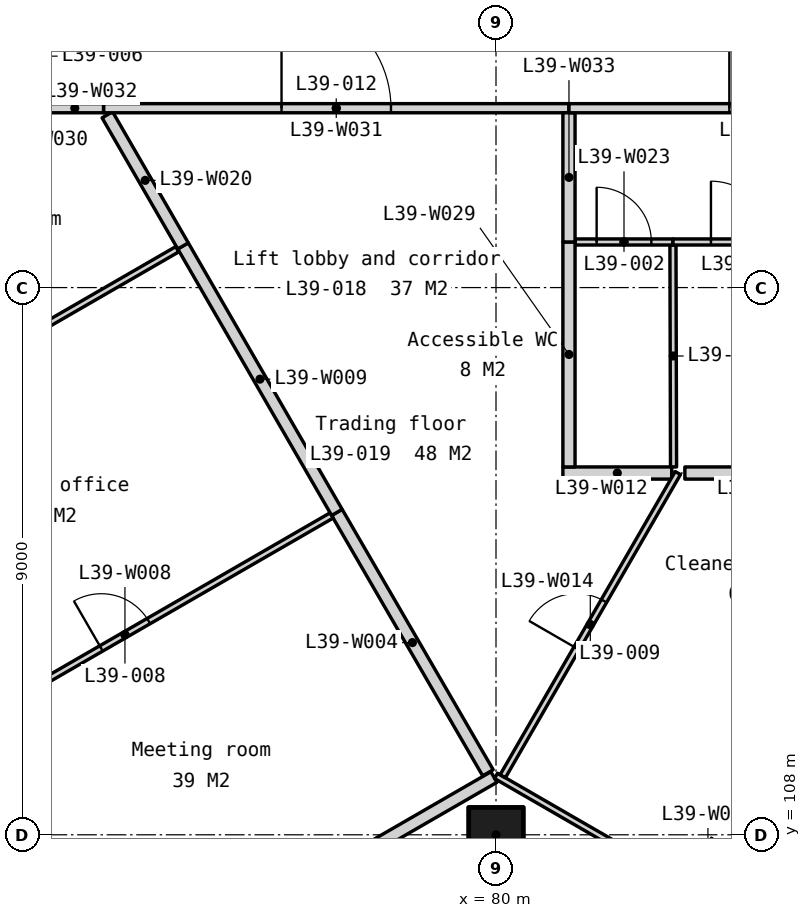
"""IFC4 building model, lengths in metres.
Left out: names, types, materials, properties, quantities, classifications, styles, units other than length and angle.
Written with IfcOpenShell. Run it as: python <this file> out.ifc"""

import sys

from ifc_helpers import new_model, si_unit, direction, frame, frame_2d, origin, origin_2d, place, context, subcontext, project, spatial, polyline, rectangle, outline, extrude, element, fill, save


model = new_model("IFC4")
c1 = context("Model", 3, precision=1e-05, world=origin(), true_north=direction((0.0, 1.0)))
c2 = subcontext(c1, "Body", "Model", "MODEL_VIEW")
j1 = project(units=[si_unit("LENGTHUNIT", "METRE"), si_unit("PLANEANGLEUNIT", "RADIAN")], contexts=[c1])
p1 = place(None, origin())
s1 = spatial("IfcSite", under=j1, at=p1, CompositionType="ELEMENT")
p2 = place(p1, origin())
s2 = spatial("IfcBuilding", under=s1, at=p2, CompositionType="ELEMENT")
p3 = place(p2, frame((0.0, 0.0, 155.9)))
s3 = spatial("IfcBuildingStorey", under=s2, at=p3, CompositionType="ELEMENT", Elevation=155.9)
p4 = place(p3, frame((80.0, 108.0, 0.0), z_axis=(0.0, 0.0, 1.0), x_axis=(1.0, 0.0, 0.0)))
e1 = element("IfcColumn", 1, at=p4, inside=s3, PredefinedType="COLUMN", context=c2, shape_type="SweptSolid", body=[
    extrude(rectangle(XDim=0.9, YDim=0.9, at=origin_2d()), origin(), (0.0, 0.0, 1.0), 3.9),
])
p5 = place(p3, frame((57.652, 131.129, -0.15), z_axis=(0.0, 0.0, 1.0), x_axis=(0.499997369791, -0.866026922331, 0.0)))
e2 = element("IfcWall", 2, at=p5, inside=s3, PredefinedType="SOLIDWALL", context=c2, shape_type="SweptSolid", body=[
    extrude(outline(polyline([(40.486, 0.0), (40.486, 3.9), (0.0, 3.9), (0.0, 0.0), (40.486, 0.0)])), frame((0.0, 0.225, 0.0), z_axis=(0.0, -1.0, 0.0), x_axis=(1.0, 0.0, 0.0)), (0.0, 0.0, 1.0), 0.45),
])
p6 = place(p5, frame((3.011, 0.0, 0.95)))
e3 = element("IfcOpeningElement", 3, at=p6, cuts=e2, PredefinedType="OPENING", context=c2, shape_type="SweptSolid", body=[
    extrude(rectangle(XDim=1.8, YDim=2.2, at=frame_2d((0.9, 1.1))), frame((0.0, 0.235, 0.0), z_axis=(0.0, -1.0, 0.0), x_axis=(1.0, 0.0, 0.0)), (0.0, 0.0, 1.0), 0.47),
])
p7 = place(p5, frame((5.311, 0.0, 0.95)))
e4 = element("IfcOpeningElement", 4, at=p7, cuts=e2, PredefinedType="OPENING", context=c2, shape_type="SweptSolid", body=[
    extrude(rectangle(XDim=1.8, YDim=2.2, at=frame_2d((0.9, 1.1))), frame((0.0, 0.235, 0.0), z_axis=(0.0, -1.0, 0.0), x_axis=(1.0, 0.0, 0.0)), (0.0, 0.0, 1.0), 0.47),
])
p8 = place(p5, frame((13.132, 0.0, 0.95)))
e5 = element("IfcOpeningElement", 5, at=p8, cuts=e2, PredefinedType="OPENING", context=c2, shape_type="SweptSolid", body=[
    extrude(rectangle(XDim=1.8, YDim=2.2, at=frame_2d((0.9, 1.1))), frame((0.0, 0.235, 0.0), z_axis=(0.0, -1.0, 0.0), x_axis=(1.0, 0.0, 0.0)), (0.0, 0.0, 1.0), 0.47),
])
p9 = place(p5, frame((15.432, 0.0, 0.95)))
e6 = element("IfcOpeningElement", 6, at=p9, cuts=e2, PredefinedType="OPENING", context=c2, shape_type="SweptSolid", body=[
    extrude(rectangle(XDim=1.8, YDim=2.2, at=frame_2d((0.9, 1.1))), frame((0.0, 0.235, 0.0), z_axis=(0.0, -1.0, 0.0), x_axis=(1.0, 0.0, 0.0)), (0.0, 0.0, 1.0), 0.47),
])
p10 = place(p5, frame((23.254, 0.0, 0.95)))
e7 = element("IfcOpeningElement", 7, at=p10, cuts=e2, PredefinedType="OPENING", context=c2, shape_type="SweptSolid", body=[
    extrude(rectangle(XDim=1.8, YDim=2.2, at=frame_2d((0.9, 1.1))), frame((0.0, 0.235, 0.0), z_axis=(0.0, -1.0, 0.0), x_axis=(1.0, 0.0, 0.0)), (0.0, 0.0, 1.0), 0.47),
])
p11 = place(p5, frame((25.554, 0.0, 0.95)))
e8 = element("IfcOpeningElement", 8, at=p11, cuts=e2, PredefinedType="OPENING", context=c2, shape_type="SweptSolid", body=[
    extrude(rectangle(XDim=1.8, YDim=2.2, at=frame_2d((0.9, 1.1))), frame((0.0, 0.235, 0.0), z_axis=(0.0, -1.0, 0.0), x_axis=(1.0, 0.0, 0.0)), (0.0, 0.0, 1.0), 0.47),
])
p12 = place(p5, frame((33.375, 0.0, 0.95)))
e9 = element("IfcOpeningElement", 9, at=p12, cuts=e2, PredefinedType="OPENING", context=c2, shape_type="SweptSolid", body=[
    extrude(rectangle(XDim=1.8, YDim=2.2, at=frame_2d((0.9, 1.1))), frame((0.0, 0.235, 0.0), z_axis=(0.0, -1.0, 0.0), x_axis=(1.0, 0.0, 0.0)), (0.0, 0.0, 1.0), 0.47),
])
p13 = place(p5, frame((35.675, 0.0, 0.95)))
e10 = element("IfcOpeningElement", 10, at=p13, cuts=e2, PredefinedType="OPENING", context=c2, shape_type="SweptSolid", body=[
    extrude(rectangle(XDim=1.8, YDim=2.2, at=frame_2d((0.9, 1.1))), frame((0.0, 0.235, 0.0), z_axis=(0.0, -1.0, 0.0), x_axis=(1.0, 0.0, 0.0)), (0.0, 0.0, 1.0), 0.47),
])
p14 = place(p3, frame((82.105, 96.067, -0.15), z_axis=(0.0, 0.0, 1.0), x_axis=(0.499997369791, 0.866026922331, 0.0)))
e11 = element("IfcWall", 11, at=p14, inside=s3, PredefinedType="SOLIDWALL", context=c2, shape_type="SweptSolid", body=[
    extrude(outline(polyline([(40.486, 0.0), (40.486, 3.9), (0.0, 3.9), (0.0, 0.0), (40.486, 0.0)])), frame((0.0, 0.225, 0.0), z_axis=(0.0, -1.0, 0.0), x_axis=(1.0, 0.0, 0.0)), (0.0, 0.0, 1.0), 0.45),
])
p15 = place(p14, frame((3.011, 0.0, 0.95)))
e12 = element("IfcOpeningElement", 12, at=p15, cuts=e11, PredefinedType="OPENING", context=c2, shape_type="SweptSolid", body=[
    extrude(rectangle(XDim=1.8, YDim=2.2, at=frame_2d((0.9, 1.1))), frame((0.0, 0.235, 0.0), z_axis=(0.0, -1.0, 0.0), x_axis=(1.0, 0.0, 0.0)), (0.0, 0.0, 1.0), 0.47),
])
p16 = place(p14, frame((5.311, 0.0, 0.95)))
e13 = element("IfcOpeningElement", 13, at=p16, cuts=e11, PredefinedType="OPENING", context=c2, shape_type="SweptSolid", body=[
    extrude(rectangle(XDim=1.8, YDim=2.2, at=frame_2d((0.9, 1.1))), frame((0.0, 0.235, 0.0), z_axis=(0.0, -1.0, 0.0), x_axis=(1.0, 0.0, 0.0)), (0.0, 0.0, 1.0), 0.47),
])
p17 = place(p14, frame((13.132, 0.0, 0.95)))
e14 = element("IfcOpeningElement", 14, at=p17, cuts=e11, PredefinedType="OPENING", context=c2, shape_type="SweptSolid", body=[
    extrude(rectangle(XDim=1.8, YDim=2.2, at=frame_2d((0.9, 1.1))), frame((0.0, 0.235, 0.0), z_axis=(0.0, -1.0, 0.0), x_axis=(1.0, 0.0, 0.0)), (0.0, 0.0, 1.0), 0.47),
])
p18 = place(p14, frame((15.432, 0.0, 0.95)))
e15 = element("IfcOpeningElement", 15, at=p18, cuts=e11, PredefinedType="OPENING", context=c2, shape_type="SweptSolid", body=[
    extrude(rectangle(XDim=1.8, YDim=2.2, at=frame_2d((0.9, 1.1))), frame((0.0, 0.235, 0.0), z_axis=(0.0, -1.0, 0.0), x_axis=(1.0, 0.0, 0.0)), (0.0, 0.0, 1.0), 0.47),
])
p19 = place(p14, frame((23.254, 0.0, 0.95)))
e16 = element("IfcOpeningElement", 16, at=p19, cuts=e11, PredefinedType="OPENING", context=c2, shape_type="SweptSolid", body=[
    extrude(rectangle(XDim=1.8, YDim=2.2, at=frame_2d((0.9, 1.1))), frame((0.0, 0.235, 0.0), z_axis=(0.0, -1.0, 0.0), x_axis=(1.0, 0.0, 0.0)), (0.0, 0.0, 1.0), 0.47),
])
p20 = place(p14, frame((25.554, 0.0, 0.95)))
e17 = element("IfcOpeningElement", 17, at=p20, cuts=e11, PredefinedType="OPENING", context=c2, shape_type="SweptSolid", body=[
    extrude(rectangle(XDim=1.8, YDim=2.2, at=frame_2d((0.9, 1.1))), frame((0.0, 0.235, 0.0), z_axis=(0.0, -1.0, 0.0), x_axis=(1.0, 0.0, 0.0)), (0.0, 0.0, 1.0), 0.47),
])
p21 = place(p14, frame((33.375, 0.0, 0.95)))
e18 = element("IfcOpeningElement", 18, at=p21, cuts=e11, PredefinedType="OPENING", context=c2, shape_type="SweptSolid", body=[
    extrude(rectangle(XDim=1.8, YDim=2.2, at=frame_2d((0.9, 1.1))), frame((0.0, 0.235, 0.0), z_axis=(0.0, -1.0, 0.0), x_axis=(1.0, 0.0, 0.0)), (0.0, 0.0, 1.0), 0.47),
])
p22 = place(p14, frame((35.675, 0.0, 0.95)))
e19 = element("IfcOpeningElement", 19, at=p22, cuts=e11, PredefinedType="OPENING", context=c2, shape_type="SweptSolid", body=[
    extrude(rectangle(XDim=1.8, YDim=2.2, at=frame_2d((0.9, 1.1))), frame((0.0, 0.235, 0.0), z_axis=(0.0, -1.0, 0.0), x_axis=(1.0, 0.0, 0.0)), (0.0, 0.0, 1.0), 0.47),
])
p23 = place(p3, frame((73.029, 104.945, 0.0), z_axis=(0.0, 0.0, 1.0), x_axis=(0.866028745538, 0.499994211868, 0.0)))
e20 = element("IfcWall", 20, at=p23, inside=s3, PredefinedType="PARTITIONING", context=c2, shape_type="SweptSolid", body=[
    extrude(rectangle(XDim=8.01, YDim=0.2, at=frame_2d((4.005, 0.0))), origin(), (0.0, 0.0, 1.0), 3.75),
])
p24 = place(p3, frame((77.384, 113.302, 0.0), z_axis=(0.0, 0.0, 1.0), x_axis=(0.501726207978, -0.865026480651, 0.0)))
e21 = element("IfcWall", 21, at=p24, inside=s3, PredefinedType="PARTITIONING", context=c2, shape_type="SweptSolid", body=[
    extrude(rectangle(XDim=4.951, YDim=0.2, at=frame_2d((2.475, 0.0))), origin(), (0.0, 0.0, 1.0), 3.75),
])
p25 = place(p3, frame((80.0, 108.969, 0.0), z_axis=(0.0, 0.0, 1.0), x_axis=(0.86602648383, -0.499998129301, 0.0)))
e22 = element("IfcWall", 22, at=p25, inside=s3, PredefinedType="PARTITIONING", context=c2, shape_type="SweptSolid", body=[
    extrude(rectangle(XDim=8.049, YDim=0.1, at=frame_2d((4.025, 0.0))), origin(), (0.0, 0.0, 1.0), 3.75),
])
p26 = place(p25, frame((3.575, 0.0, 0.0)))
e23 = element("IfcOpeningElement", 23, at=p26, cuts=e22, PredefinedType="OPENING", context=c2, shape_type="SweptSolid", body=[
    extrude(rectangle(XDim=0.9, YDim=2.1, at=frame_2d((0.45, 1.05))), frame((0.0, 0.06, 0.0), z_axis=(0.0, -1.0, 0.0), x_axis=(1.0, 0.0, 0.0)), (0.0, 0.0, 1.0), 0.12),
])
p27 = place(p3, frame((70.499, 109.327, 0.0), z_axis=(0.0, 0.0, 1.0), x_axis=(0.86602399778, 0.500002435262, 0.0)))
e24 = element("IfcWall", 24, at=p27, inside=s3, PredefinedType="PARTITIONING", context=c2, shape_type="SweptSolid", body=[
    extrude(rectangle(XDim=7.85, YDim=0.1, at=frame_2d((3.925, 0.0))), origin(), (0.0, 0.0, 1.0), 3.75),
])
p28 = place(p27, frame((3.475, 0.0, 0.0)))
e25 = element("IfcOpeningElement", 25, at=p28, cuts=e24, PredefinedType="OPENING", context=c2, shape_type="SweptSolid", body=[
    extrude(rectangle(XDim=0.9, YDim=2.1, at=frame_2d((0.45, 1.05))), frame((0.0, 0.06, 0.0), z_axis=(0.0, -1.0, 0.0), x_axis=(1.0, 0.0, 0.0)), (0.0, 0.0, 1.0), 0.12),
])
p29 = place(p3, frame((74.853, 117.685, 0.0), z_axis=(0.0, 0.0, 1.0), x_axis=(0.500014760403, -0.866016881694, 0.0)))
e26 = element("IfcWall", 26, at=p29, inside=s3, PredefinedType="PARTITIONING", context=c2, shape_type="SweptSolid", body=[
    extrude(rectangle(XDim=5.061, YDim=0.2, at=frame_2d((2.53, 0.0))), origin(), (0.0, 0.0, 1.0), 3.75),
])
p30 = place(p3, frame((67.968, 113.71, 0.0), z_axis=(0.0, 0.0, 1.0), x_axis=(0.866013415921, 0.500020763015, 0.0)))
e27 = element("IfcWall", 27, at=p30, inside=s3, PredefinedType="PARTITIONING", context=c2, shape_type="SweptSolid", body=[
    extrude(rectangle(XDim=7.84, YDim=0.1, at=frame_2d((3.92, 0.0))), origin(), (0.0, 0.0, 1.0), 3.75),
])
p31 = place(p30, frame((3.47, 0.0, 0.0)))
e28 = element("IfcOpeningElement", 28, at=p31, cuts=e27, PredefinedType="OPENING", context=c2, shape_type="SweptSolid", body=[
    extrude(rectangle(XDim=0.9, YDim=2.1, at=frame_2d((0.45, 1.05))), frame((0.0, 0.06, 0.0), z_axis=(0.0, -1.0, 0.0), x_axis=(1.0, 0.0, 0.0)), (0.0, 0.0, 1.0), 0.12),
])
p32 = place(p3, frame((81.1, 113.95, 0.0), z_axis=(0.0, 0.0, 1.0), x_axis=(1.0, 0.0, 0.0)))
e29 = element("IfcWall", 29, at=p32, inside=s3, PredefinedType="PARTITIONING", context=c2, shape_type="SweptSolid", body=[
    extrude(rectangle(XDim=1.79, YDim=0.2, at=frame_2d((0.895, 0.0))), origin(), (0.0, 0.0, 1.0), 3.75),
])
p33 = place(p3, frame((80.111, 108.963, 0.0), z_axis=(0.0, 0.0, 1.0), x_axis=(0.500033177651, 0.866006247812, 0.0)))
e30 = element("IfcWall", 30, at=p33, inside=s3, PredefinedType="PARTITIONING", context=c2, shape_type="SweptSolid", body=[
    extrude(rectangle(XDim=5.758, YDim=0.1, at=frame_2d((2.879, 0.0))), origin(), (0.0, 0.0, 1.0), 3.75),
])
p34 = place(p33, frame((2.429, 0.0, 0.0)))
e31 = element("IfcOpeningElement", 31, at=p34, cuts=e30, PredefinedType="OPENING", context=c2, shape_type="SweptSolid", body=[
    extrude(rectangle(XDim=0.9, YDim=2.1, at=frame_2d((0.45, 1.05))), frame((0.0, 0.06, 0.0), z_axis=(0.0, -1.0, 0.0), x_axis=(1.0, 0.0, 0.0)), (0.0, 0.0, 1.0), 0.12),
])
p35 = place(p3, frame((83.106, 113.95, 0.0), z_axis=(0.0, 0.0, 1.0), x_axis=(1.0, 0.0, 0.0)))
e32 = element("IfcWall", 32, at=p35, inside=s3, PredefinedType="PARTITIONING", context=c2, shape_type="SweptSolid", body=[
    extrude(rectangle(XDim=2.044, YDim=0.2, at=frame_2d((1.022, 0.0))), origin(), (0.0, 0.0, 1.0), 3.75),
])
p36 = place(p3, frame((73.608, 119.842, 0.0), z_axis=(0.0, 0.0, 1.0), x_axis=(0.50001949124, -0.86601415022, 0.0)))
e33 = element("IfcWall", 33, at=p36, inside=s3, PredefinedType="PARTITIONING", context=c2, shape_type="SweptSolid", body=[
    extrude(rectangle(XDim=2.49, YDim=0.2, at=frame_2d((1.245, 0.0))), origin(), (0.0, 0.0, 1.0), 3.75),
])
p37 = place(p3, frame((82.92, 114.05, 0.0), z_axis=(0.0, 0.0, 1.0), x_axis=(-0.002608686776, 0.999996597371, 0.0)))
e34 = element("IfcWall", 34, at=p37, inside=s3, PredefinedType="PARTITIONING", context=c2, shape_type="SweptSolid", body=[
    extrude(rectangle(XDim=3.65, YDim=0.1, at=frame_2d((1.825, 0.0))), origin(), (0.0, 0.0, 1.0), 3.75),
])
p38 = place(p3, frame((81.3, 117.75, 0.0), z_axis=(0.0, 0.0, 1.0), x_axis=(1.0, 0.0, 0.0)))
e35 = element("IfcWall", 35, at=p38, inside=s3, PredefinedType="PARTITIONING", context=c2, shape_type="SweptSolid", body=[
    extrude(rectangle(XDim=1.61, YDim=0.1, at=frame_2d((0.805, 0.0))), origin(), (0.0, 0.0, 1.0), 3.75),
])
p39 = place(p38, frame((0.355, 0.0, 0.0)))
e36 = element("IfcOpeningElement", 36, at=p39, cuts=e35, PredefinedType="OPENING", context=c2, shape_type="SweptSolid", body=[
    extrude(rectangle(XDim=0.9, YDim=2.1, at=frame_2d((0.45, 1.05))), frame((0.0, 0.06, 0.0), z_axis=(0.0, -1.0, 0.0), x_axis=(1.0, 0.0, 0.0)), (0.0, 0.0, 1.0), 0.12),
])
p40 = place(p3, frame((82.91, 117.75, 0.0), z_axis=(0.0, 0.0, 1.0), x_axis=(1.0, 0.0, 0.0)))
e37 = element("IfcWall", 37, at=p40, inside=s3, PredefinedType="PARTITIONING", context=c2, shape_type="SweptSolid", body=[
    extrude(rectangle(XDim=2.25, YDim=0.1, at=frame_2d((1.125, 0.0))), origin(), (0.0, 0.0, 1.0), 3.75),
])
p41 = place(p40, frame((0.625, 0.0, 0.0)))
e38 = element("IfcOpeningElement", 38, at=p41, cuts=e37, PredefinedType="OPENING", context=c2, shape_type="SweptSolid", body=[
    extrude(rectangle(XDim=1.0, YDim=2.1, at=frame_2d((0.5, 1.05))), frame((0.0, 0.06, 0.0), z_axis=(0.0, -1.0, 0.0), x_axis=(1.0, 0.0, 0.0)), (0.0, 0.0, 1.0), 0.12),
])
p42 = place(p3, frame((81.2, 114.05, 0.0), z_axis=(0.0, 0.0, 1.0), x_axis=(0.0, 1.0, 0.0)))
e39 = element("IfcWall", 39, at=p42, inside=s3, PredefinedType="PARTITIONING", context=c2, shape_type="SweptSolid", body=[
    extrude(rectangle(XDim=3.7, YDim=0.2, at=frame_2d((1.85, 0.0))), origin(), (0.0, 0.0, 1.0), 3.75),
])
p43 = place(p3, frame((73.545, 119.95, 0.0), z_axis=(0.0, 0.0, 1.0), x_axis=(1.0, 0.0, 0.0)))
e40 = element("IfcWall", 40, at=p43, inside=s3, PredefinedType="PARTITIONING", context=c2, shape_type="SweptSolid", body=[
    extrude(rectangle(XDim=7.655, YDim=0.15, at=frame_2d((3.827, 0.0))), origin(), (0.0, 0.0, 1.0), 3.75),
])
p44 = place(p43, frame((2.927, 0.0, 0.0)))
e41 = element("IfcOpeningElement", 41, at=p44, cuts=e40, PredefinedType="OPENING", context=c2, shape_type="SweptSolid", body=[
    extrude(rectangle(XDim=1.8, YDim=2.1, at=frame_2d((0.9, 1.05))), frame((0.0, 0.085, 0.0), z_axis=(0.0, -1.0, 0.0), x_axis=(1.0, 0.0, 0.0)), (0.0, 0.0, 1.0), 0.17),
])
p45 = place(p3, frame((72.6, 119.95, 0.0), z_axis=(0.0, 0.0, 1.0), x_axis=(1.0, 0.0, 0.0)))
e42 = element("IfcWall", 42, at=p45, inside=s3, PredefinedType="PARTITIONING", context=c2, shape_type="SweptSolid", body=[
    extrude(rectangle(XDim=0.945, YDim=0.15, at=frame_2d((0.473, 0.0))), origin(), (0.0, 0.0, 1.0), 3.75),
])
p46 = place(p3, frame((81.2, 117.75, 0.0), z_axis=(0.0, 0.0, 1.0), x_axis=(0.0, 1.0, 0.0)))
e43 = element("IfcWall", 43, at=p46, inside=s3, PredefinedType="PARTITIONING", context=c2, shape_type="SweptSolid", body=[
    extrude(rectangle(XDim=2.125, YDim=0.2, at=frame_2d((1.062, 0.0))), origin(), (0.0, 0.0, 1.0), 3.75),
])
p47 = place(p3, frame((81.2, 119.95, 0.0), z_axis=(0.0, 0.0, 1.0), x_axis=(1.0, 0.0, 0.0)))
e44 = element("IfcWall", 44, at=p47, inside=s3, PredefinedType="PARTITIONING", context=c2, shape_type="SweptSolid", body=[
    extrude(rectangle(XDim=6.275, YDim=0.15, at=frame_2d((3.138, 0.0))), origin(), (0.0, 0.0, 1.0), 3.75),
])
p48 = place(p47, frame((2.637, 0.0, 0.0)))
e45 = element("IfcOpeningElement", 45, at=p48, cuts=e44, PredefinedType="OPENING", context=c2, shape_type="SweptSolid", body=[
    extrude(rectangle(XDim=1.0, YDim=2.1, at=frame_2d((0.5, 1.05))), frame((0.0, 0.085, 0.0), z_axis=(0.0, -1.0, 0.0), x_axis=(1.0, 0.0, 0.0)), (0.0, 0.0, 1.0), 0.17),
])
p49 = place(p48, origin())
e46 = element("IfcDoor", 46, at=p49, inside=s3, OperationType="SINGLE_SWING_LEFT", PredefinedType="DOOR", context=c2, shape_type="SweptSolid", body=[
    extrude(rectangle(XDim=1.0, YDim=2.1, at=frame_2d((0.5, 1.05))), frame((0.0, 0.025, 0.0), z_axis=(0.0, -1.0, 0.0), x_axis=(1.0, 0.0, 0.0)), (0.0, 0.0, 1.0), 0.05),
])
fill(e45, e46)
p50 = place(p39, origin())
e47 = element("IfcDoor", 47, at=p50, inside=s3, OperationType="SINGLE_SWING_LEFT", PredefinedType="DOOR", context=c2, shape_type="SweptSolid", body=[
    extrude(rectangle(XDim=0.9, YDim=2.1, at=frame_2d((0.45, 1.05))), frame((0.0, 0.025, 0.0), z_axis=(0.0, -1.0, 0.0), x_axis=(1.0, 0.0, 0.0)), (0.0, 0.0, 1.0), 0.05),
])
fill(e36, e47)
p51 = place(p41, origin())
e48 = element("IfcDoor", 48, at=p51, inside=s3, OperationType="SINGLE_SWING_LEFT", PredefinedType="DOOR", context=c2, shape_type="SweptSolid", body=[
    extrude(rectangle(XDim=1.0, YDim=2.1, at=frame_2d((0.5, 1.05))), frame((0.0, 0.025, 0.0), z_axis=(0.0, -1.0, 0.0), x_axis=(1.0, 0.0, 0.0)), (0.0, 0.0, 1.0), 0.05),
])
fill(e38, e48)
p52 = place(p28, origin())
e49 = element("IfcDoor", 49, at=p52, inside=s3, OperationType="SINGLE_SWING_LEFT", PredefinedType="DOOR", context=c2, shape_type="SweptSolid", body=[
    extrude(rectangle(XDim=0.9, YDim=2.1, at=frame_2d((0.45, 1.05))), frame((0.0, 0.025, 0.0), z_axis=(0.0, -1.0, 0.0), x_axis=(1.0, 0.0, 0.0)), (0.0, 0.0, 1.0), 0.05),
])
fill(e25, e49)
p53 = place(p34, origin())
e50 = element("IfcDoor", 50, at=p53, inside=s3, OperationType="SINGLE_SWING_LEFT", PredefinedType="DOOR", context=c2, shape_type="SweptSolid", body=[
    extrude(rectangle(XDim=0.9, YDim=2.1, at=frame_2d((0.45, 1.05))), frame((0.0, 0.025, 0.0), z_axis=(0.0, -1.0, 0.0), x_axis=(1.0, 0.0, 0.0)), (0.0, 0.0, 1.0), 0.05),
])
fill(e31, e50)
p54 = place(p44, origin())
e51 = element("IfcDoor", 51, at=p54, inside=s3, OperationType="SINGLE_SWING_LEFT", PredefinedType="DOOR", context=c2, shape_type="SweptSolid", body=[
    extrude(rectangle(XDim=1.8, YDim=2.1, at=frame_2d((0.9, 1.05))), frame((0.0, 0.025, 0.0), z_axis=(0.0, -1.0, 0.0), x_axis=(1.0, 0.0, 0.0)), (0.0, 0.0, 1.0), 0.05),
])
fill(e41, e51)
save(model, sys.argv[1])
